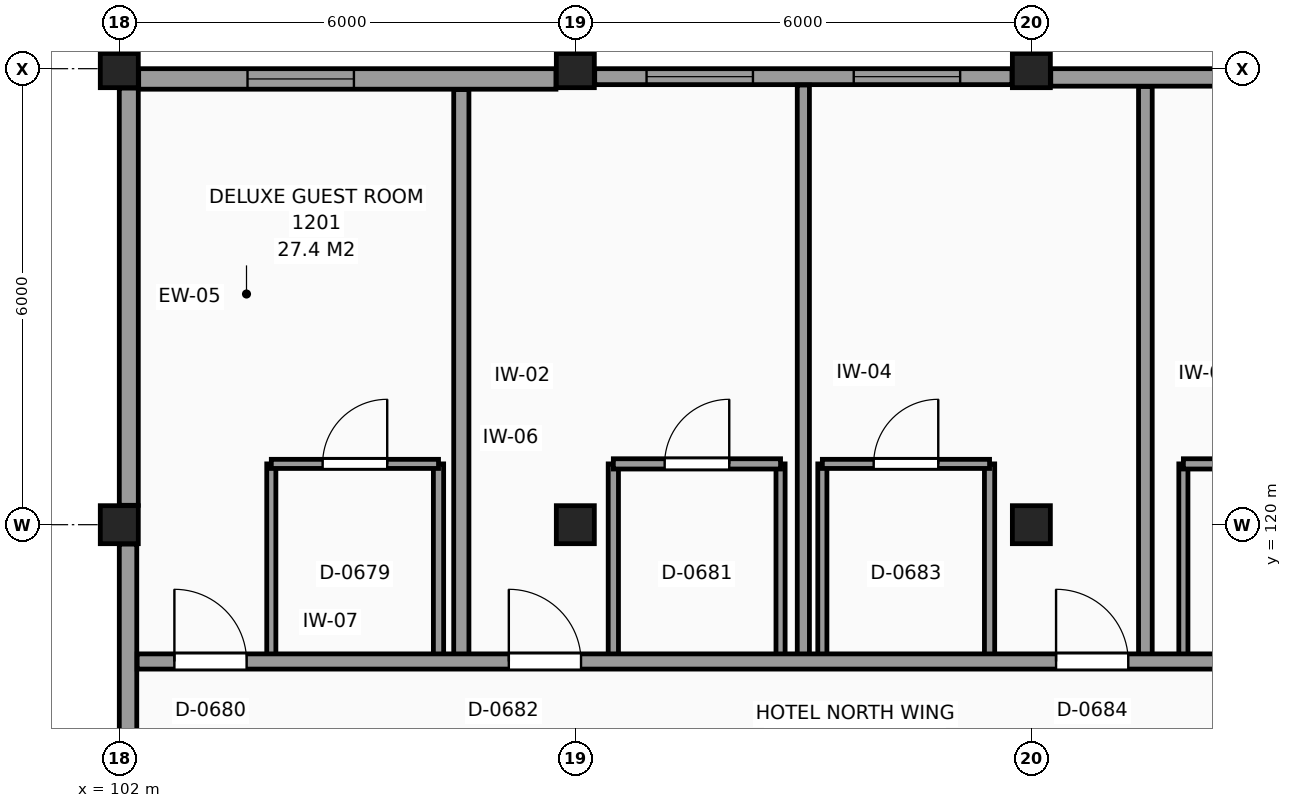
"""IFC4 building model, lengths in metres.
Left out: names, types, materials, properties, quantities, classifications, styles, units other than length and angle.
Written with IfcOpenShell. Run it as: python <this file> out.ifc"""

import sys

from ifc_helpers import new_model, si_unit, direction, frame, frame_2d, origin, origin_2d, place, context, subcontext, project, spatial, rectangle, extrude, element, fill, save


model = new_model("IFC4")
c1 = context("Model", 3, precision=1e-05, world=origin(), true_north=direction((0.0, 1.0)))
c2 = subcontext(c1, "Body", "Model", "MODEL_VIEW")
j1 = project(units=[si_unit("LENGTHUNIT", "METRE"), si_unit("PLANEANGLEUNIT", "RADIAN")], contexts=[c1])
p1 = place(None, origin())
s1 = spatial("IfcSite", under=j1, at=p1, CompositionType="ELEMENT")
p2 = place(p1, origin())
s2 = spatial("IfcBuilding", under=s1, at=p2, CompositionType="ELEMENT")
p3 = place(p2, frame((0.0, 0.0, 48.0)))
s3 = spatial("IfcBuildingStorey", under=s2, at=p3, CompositionType="ELEMENT", Elevation=48.0)
for number, where, z_axis, x_axis in (
    (1, (102.0, 120.0, 0.0), (0.0, 0.0, 1.0), (1.0, 0.0, 0.0)),
    (2, (102.0, 126.0, 0.0), (0.0, 0.0, 1.0), (1.0, 0.0, 0.0)),
    (3, (108.0, 120.0, 0.0), (0.0, 0.0, 1.0), (1.0, 0.0, 0.0)),
    (4, (108.0, 126.0, 0.0), (0.0, 0.0, 1.0), (1.0, 0.0, 0.0)),
    (5, (114.0, 120.0, 0.0), (0.0, 0.0, 1.0), (1.0, 0.0, 0.0)),
    (6, (114.0, 126.0, 0.0), (0.0, 0.0, 1.0), (1.0, 0.0, 0.0)),
):
    element("IfcColumn", number, at=place(p3, frame(where, z_axis=z_axis, x_axis=x_axis)), inside=s3, PredefinedType="COLUMN", context=c2, shape_type="SweptSolid", body=[
        extrude(rectangle(XDim=0.5, YDim=0.5, at=origin_2d()), origin(), (0.0, 0.0, 1.0), 3.3),
    ])
p4 = place(p3, frame((119.745, 125.885, 0.0), z_axis=(0.0, 0.0, 1.0), x_axis=(-1.0, 0.0, 0.0)))
e7 = element("IfcWall", 7, at=p4, inside=s3, PredefinedType="SOLIDWALL", context=c2, shape_type="SweptSolid", body=[
    extrude(rectangle(XDim=5.49, YDim=0.23, at=frame_2d((2.745, 0.0))), origin(), (0.0, 0.0, 1.0), 2.4),
])
p5 = place(p3, frame((113.745, 125.895, 0.0), z_axis=(0.0, 0.0, 1.0), x_axis=(-1.0, 0.0, 0.0)))
e8 = element("IfcWall", 8, at=p5, inside=s3, PredefinedType="SOLIDWALL", context=c2, shape_type="SweptSolid", body=[
    extrude(rectangle(XDim=5.49, YDim=0.21, at=frame_2d((2.745, 0.0))), origin(), (0.0, 0.0, 1.0), 2.4),
])
p6 = place(p5, frame((3.408, 0.0, 0.8)))
e9 = element("IfcOpeningElement", 9, at=p6, cuts=e8, PredefinedType="OPENING", context=c2, shape_type="SweptSolid", body=[
    extrude(rectangle(XDim=1.4, YDim=1.4, at=frame_2d((0.7, 0.7))), frame((0.0, 0.115, 0.0), z_axis=(0.0, -1.0, 0.0), x_axis=(1.0, 0.0, 0.0)), (0.0, 0.0, 1.0), 0.23),
])
p7 = place(p5, frame((0.682, 0.0, 0.8)))
e10 = element("IfcOpeningElement", 10, at=p7, cuts=e8, PredefinedType="OPENING", context=c2, shape_type="SweptSolid", body=[
    extrude(rectangle(XDim=1.4, YDim=1.4, at=frame_2d((0.7, 0.7))), frame((0.0, 0.115, 0.0), z_axis=(0.0, -1.0, 0.0), x_axis=(1.0, 0.0, 0.0)), (0.0, 0.0, 1.0), 0.23),
])
p8 = place(p3, frame((107.745, 125.865, 0.0), z_axis=(0.0, 0.0, 1.0), x_axis=(-1.0, 0.0, 0.0)))
e11 = element("IfcWall", 11, at=p8, inside=s3, PredefinedType="SOLIDWALL", context=c2, shape_type="SweptSolid", body=[
    extrude(rectangle(XDim=5.49, YDim=0.27, at=frame_2d((2.745, 0.0))), origin(), (0.0, 0.0, 1.0), 2.4),
])
p9 = place(p8, frame((2.658, 0.0, 0.8)))
e12 = element("IfcOpeningElement", 12, at=p9, cuts=e11, PredefinedType="OPENING", context=c2, shape_type="SweptSolid", body=[
    extrude(rectangle(XDim=1.4, YDim=1.4, at=frame_2d((0.7, 0.7))), frame((0.0, 0.145, 0.0), z_axis=(0.0, -1.0, 0.0), x_axis=(1.0, 0.0, 0.0)), (0.0, 0.0, 1.0), 0.29),
])
p10 = place(p3, frame((102.125, 125.745, 0.0), z_axis=(0.0, 0.0, 1.0), x_axis=(0.0, -1.0, 0.0)))
e13 = element("IfcWall", 13, at=p10, inside=s3, PredefinedType="SOLIDWALL", context=c2, shape_type="SweptSolid", body=[
    extrude(rectangle(XDim=5.49, YDim=0.25, at=frame_2d((2.745, 0.0))), origin(), (0.0, 0.0, 1.0), 2.25),
])
p11 = place(p3, frame((102.115, 119.745, 0.0), z_axis=(0.0, 0.0, 1.0), x_axis=(0.0, -1.0, 0.0)))
e14 = element("IfcWall", 14, at=p11, inside=s3, PredefinedType="SOLIDWALL", context=c2, shape_type="SweptSolid", body=[
    extrude(rectangle(XDim=5.49, YDim=0.23, at=frame_2d((2.745, 0.0))), origin(), (0.0, 0.0, 1.0), 2.25),
])
p12 = place(p3, frame((104.0, 118.2, 0.0), z_axis=(0.0, 0.0, 1.0), x_axis=(0.0, 1.0, 0.0)))
e15 = element("IfcWall", 15, at=p12, inside=s3, PredefinedType="PARTITIONING", context=c2, shape_type="SweptSolid", body=[
    extrude(rectangle(XDim=2.6, YDim=0.12, at=frame_2d((1.3, 0.0))), origin(), (0.0, 0.0, 1.0), 3.05),
])
p13 = place(p3, frame((106.2, 118.2, 0.0), z_axis=(0.0, 0.0, 1.0), x_axis=(0.0, 1.0, 0.0)))
e16 = element("IfcWall", 16, at=p13, inside=s3, PredefinedType="PARTITIONING", context=c2, shape_type="SweptSolid", body=[
    extrude(rectangle(XDim=2.6, YDim=0.135, at=frame_2d((1.3, 0.0))), origin(), (0.0, 0.0, 1.0), 3.05),
])
p14 = place(p3, frame((106.5, 118.2, 0.0), z_axis=(0.0, 0.0, 1.0), x_axis=(0.0, 1.0, 0.0)))
e17 = element("IfcWall", 17, at=p14, inside=s3, PredefinedType="PARTITIONING", context=c2, shape_type="SweptSolid", body=[
    extrude(rectangle(XDim=7.525, YDim=0.2, at=frame_2d((3.763, 0.0))), origin(), (0.0, 0.0, 1.0), 3.05),
])
p15 = place(p3, frame((108.5, 118.2, 0.0), z_axis=(0.0, 0.0, 1.0), x_axis=(0.0, 1.0, 0.0)))
e18 = element("IfcWall", 18, at=p15, inside=s3, PredefinedType="PARTITIONING", context=c2, shape_type="SweptSolid", body=[
    extrude(rectangle(XDim=2.6, YDim=0.135, at=frame_2d((1.3, 0.0))), origin(), (0.0, 0.0, 1.0), 3.05),
])
p16 = place(p3, frame((110.7, 118.2, 0.0), z_axis=(0.0, 0.0, 1.0), x_axis=(0.0, 1.0, 0.0)))
e19 = element("IfcWall", 19, at=p16, inside=s3, PredefinedType="PARTITIONING", context=c2, shape_type="SweptSolid", body=[
    extrude(rectangle(XDim=2.6, YDim=0.12, at=frame_2d((1.3, 0.0))), origin(), (0.0, 0.0, 1.0), 3.05),
])
p17 = place(p3, frame((111.0, 118.2, 0.0), z_axis=(0.0, 0.0, 1.0), x_axis=(0.0, 1.0, 0.0)))
e20 = element("IfcWall", 20, at=p17, inside=s3, PredefinedType="PARTITIONING", context=c2, shape_type="SweptSolid", body=[
    extrude(rectangle(XDim=7.585, YDim=0.16, at=frame_2d((3.792, 0.0))), origin(), (0.0, 0.0, 1.0), 3.05),
])
p18 = place(p3, frame((111.25, 118.2, 0.0), z_axis=(0.0, 0.0, 1.0), x_axis=(0.0, 1.0, 0.0)))
e21 = element("IfcWall", 21, at=p18, inside=s3, PredefinedType="PARTITIONING", context=c2, shape_type="SweptSolid", body=[
    extrude(rectangle(XDim=2.6, YDim=0.12, at=frame_2d((1.3, 0.0))), origin(), (0.0, 0.0, 1.0), 3.05),
])
p19 = place(p3, frame((113.45, 118.2, 0.0), z_axis=(0.0, 0.0, 1.0), x_axis=(0.0, 1.0, 0.0)))
e22 = element("IfcWall", 22, at=p19, inside=s3, PredefinedType="PARTITIONING", context=c2, shape_type="SweptSolid", body=[
    extrude(rectangle(XDim=2.6, YDim=0.135, at=frame_2d((1.3, 0.0))), origin(), (0.0, 0.0, 1.0), 3.05),
])
p20 = place(p3, frame((115.5, 118.2, 0.0), z_axis=(0.0, 0.0, 1.0), x_axis=(0.0, 1.0, 0.0)))
e23 = element("IfcWall", 23, at=p20, inside=s3, PredefinedType="PARTITIONING", context=c2, shape_type="SweptSolid", body=[
    extrude(rectangle(XDim=7.565, YDim=0.18, at=frame_2d((3.782, 0.0))), origin(), (0.0, 0.0, 1.0), 3.05),
])
p21 = place(p3, frame((116.0, 118.2, 0.0), z_axis=(0.0, 0.0, 1.0), x_axis=(0.0, 1.0, 0.0)))
e24 = element("IfcWall", 24, at=p21, inside=s3, PredefinedType="PARTITIONING", context=c2, shape_type="SweptSolid", body=[
    extrude(rectangle(XDim=2.6, YDim=0.12, at=frame_2d((1.3, 0.0))), origin(), (0.0, 0.0, 1.0), 3.05),
])
p22 = place(p3, frame((102.235, 118.2, 0.0), z_axis=(0.0, 0.0, 1.0), x_axis=(1.0, 0.0, 0.0)))
e25 = element("IfcWall", 25, at=p22, inside=s3, PredefinedType="PARTITIONING", context=c2, shape_type="SweptSolid", body=[
    extrude(rectangle(XDim=74.265, YDim=0.2, at=frame_2d((37.132, 0.0))), origin(), (0.0, 0.0, 1.0), 3.05),
])
p23 = place(p22, frame((0.49, 0.0, 0.0)))
e26 = element("IfcOpeningElement", 26, at=p23, cuts=e25, PredefinedType="OPENING", context=c2, shape_type="SweptSolid", body=[
    extrude(rectangle(XDim=0.95, YDim=2.1, at=frame_2d((0.475, 1.05))), frame((0.0, 0.11, 0.0), z_axis=(0.0, -1.0, 0.0), x_axis=(1.0, 0.0, 0.0)), (0.0, 0.0, 1.0), 0.22),
])
p24 = place(p22, frame((4.89, 0.0, 0.0)))
e27 = element("IfcOpeningElement", 27, at=p24, cuts=e25, PredefinedType="OPENING", context=c2, shape_type="SweptSolid", body=[
    extrude(rectangle(XDim=0.95, YDim=2.1, at=frame_2d((0.475, 1.05))), frame((0.0, 0.11, 0.0), z_axis=(0.0, -1.0, 0.0), x_axis=(1.0, 0.0, 0.0)), (0.0, 0.0, 1.0), 0.22),
])
p25 = place(p22, frame((12.09, 0.0, 0.0)))
e28 = element("IfcOpeningElement", 28, at=p25, cuts=e25, PredefinedType="OPENING", context=c2, shape_type="SweptSolid", body=[
    extrude(rectangle(XDim=0.95, YDim=2.1, at=frame_2d((0.475, 1.05))), frame((0.0, 0.11, 0.0), z_axis=(0.0, -1.0, 0.0), x_axis=(1.0, 0.0, 0.0)), (0.0, 0.0, 1.0), 0.22),
])
p26 = place(p22, frame((20.34, 0.0, 0.0)))
e29 = element("IfcOpeningElement", 29, at=p26, cuts=e25, PredefinedType="OPENING", context=c2, shape_type="SweptSolid", body=[
    extrude(rectangle(XDim=0.95, YDim=2.1, at=frame_2d((0.475, 1.05))), frame((0.0, 0.11, 0.0), z_axis=(0.0, -1.0, 0.0), x_axis=(1.0, 0.0, 0.0)), (0.0, 0.0, 1.0), 0.22),
])
p27 = place(p22, frame((32.34, 0.0, 0.0)))
e30 = element("IfcOpeningElement", 30, at=p27, cuts=e25, PredefinedType="OPENING", context=c2, shape_type="SweptSolid", body=[
    extrude(rectangle(XDim=0.95, YDim=2.1, at=frame_2d((0.475, 1.05))), frame((0.0, 0.11, 0.0), z_axis=(0.0, -1.0, 0.0), x_axis=(1.0, 0.0, 0.0)), (0.0, 0.0, 1.0), 0.22),
])
p28 = place(p22, frame((34.89, 0.0, 0.0)))
e31 = element("IfcOpeningElement", 31, at=p28, cuts=e25, PredefinedType="OPENING", context=c2, shape_type="SweptSolid", body=[
    extrude(rectangle(XDim=0.95, YDim=2.1, at=frame_2d((0.475, 1.05))), frame((0.0, 0.11, 0.0), z_axis=(0.0, -1.0, 0.0), x_axis=(1.0, 0.0, 0.0)), (0.0, 0.0, 1.0), 0.22),
])
p29 = place(p22, frame((42.09, 0.0, 0.0)))
e32 = element("IfcOpeningElement", 32, at=p29, cuts=e25, PredefinedType="OPENING", context=c2, shape_type="SweptSolid", body=[
    extrude(rectangle(XDim=0.95, YDim=2.1, at=frame_2d((0.475, 1.05))), frame((0.0, 0.11, 0.0), z_axis=(0.0, -1.0, 0.0), x_axis=(1.0, 0.0, 0.0)), (0.0, 0.0, 1.0), 0.22),
])
p30 = place(p22, frame((46.29, 0.0, 0.0)))
e33 = element("IfcOpeningElement", 33, at=p30, cuts=e25, PredefinedType="OPENING", context=c2, shape_type="SweptSolid", body=[
    extrude(rectangle(XDim=0.95, YDim=2.1, at=frame_2d((0.475, 1.05))), frame((0.0, 0.11, 0.0), z_axis=(0.0, -1.0, 0.0), x_axis=(1.0, 0.0, 0.0)), (0.0, 0.0, 1.0), 0.22),
])
p31 = place(p22, frame((55.59, 0.0, 0.0)))
e34 = element("IfcOpeningElement", 34, at=p31, cuts=e25, PredefinedType="OPENING", context=c2, shape_type="SweptSolid", body=[
    extrude(rectangle(XDim=0.95, YDim=2.1, at=frame_2d((0.475, 1.05))), frame((0.0, 0.11, 0.0), z_axis=(0.0, -1.0, 0.0), x_axis=(1.0, 0.0, 0.0)), (0.0, 0.0, 1.0), 0.22),
])
p32 = place(p22, frame((60.09, 0.0, 0.0)))
e35 = element("IfcOpeningElement", 35, at=p32, cuts=e25, PredefinedType="OPENING", context=c2, shape_type="SweptSolid", body=[
    extrude(rectangle(XDim=0.95, YDim=2.1, at=frame_2d((0.475, 1.05))), frame((0.0, 0.11, 0.0), z_axis=(0.0, -1.0, 0.0), x_axis=(1.0, 0.0, 0.0)), (0.0, 0.0, 1.0), 0.22),
])
p33 = place(p22, frame((64.29, 0.0, 0.0)))
e36 = element("IfcOpeningElement", 36, at=p33, cuts=e25, PredefinedType="OPENING", context=c2, shape_type="SweptSolid", body=[
    extrude(rectangle(XDim=0.95, YDim=2.1, at=frame_2d((0.475, 1.05))), frame((0.0, 0.11, 0.0), z_axis=(0.0, -1.0, 0.0), x_axis=(1.0, 0.0, 0.0)), (0.0, 0.0, 1.0), 0.22),
])
p34 = place(p22, frame((68.24, 0.0, 0.0)))
e37 = element("IfcOpeningElement", 37, at=p34, cuts=e25, PredefinedType="OPENING", context=c2, shape_type="SweptSolid", body=[
    extrude(rectangle(XDim=0.95, YDim=2.1, at=frame_2d((0.475, 1.05))), frame((0.0, 0.11, 0.0), z_axis=(0.0, -1.0, 0.0), x_axis=(1.0, 0.0, 0.0)), (0.0, 0.0, 1.0), 0.22),
])
p35 = place(p3, frame((104.0, 120.8, 0.0), z_axis=(0.0, 0.0, 1.0), x_axis=(1.0, 0.0, 0.0)))
e38 = element("IfcWall", 38, at=p35, inside=s3, PredefinedType="PARTITIONING", context=c2, shape_type="SweptSolid", body=[
    extrude(rectangle(XDim=2.2, YDim=0.12, at=frame_2d((1.1, 0.0))), origin(), (0.0, 0.0, 1.0), 3.05),
])
p36 = place(p35, frame((0.675, 0.0, 0.0)))
e39 = element("IfcOpeningElement", 39, at=p36, cuts=e38, PredefinedType="OPENING", context=c2, shape_type="SweptSolid", body=[
    extrude(rectangle(XDim=0.85, YDim=2.1, at=frame_2d((0.425, 1.05))), frame((0.0, 0.07, 0.0), z_axis=(0.0, -1.0, 0.0), x_axis=(1.0, 0.0, 0.0)), (0.0, 0.0, 1.0), 0.14),
])
p37 = place(p3, frame((108.5, 120.8, 0.0), z_axis=(0.0, 0.0, 1.0), x_axis=(1.0, 0.0, 0.0)))
e40 = element("IfcWall", 40, at=p37, inside=s3, PredefinedType="PARTITIONING", context=c2, shape_type="SweptSolid", body=[
    extrude(rectangle(XDim=2.2, YDim=0.135, at=frame_2d((1.1, 0.0))), origin(), (0.0, 0.0, 1.0), 3.05),
])
p38 = place(p37, frame((0.675, 0.0, 0.0)))
e41 = element("IfcOpeningElement", 41, at=p38, cuts=e40, PredefinedType="OPENING", context=c2, shape_type="SweptSolid", body=[
    extrude(rectangle(XDim=0.85, YDim=2.1, at=frame_2d((0.425, 1.05))), frame((0.0, 0.078, 0.0), z_axis=(0.0, -1.0, 0.0), x_axis=(1.0, 0.0, 0.0)), (0.0, 0.0, 1.0), 0.155),
])
p39 = place(p3, frame((111.25, 120.8, 0.0), z_axis=(0.0, 0.0, 1.0), x_axis=(1.0, 0.0, 0.0)))
e42 = element("IfcWall", 42, at=p39, inside=s3, PredefinedType="PARTITIONING", context=c2, shape_type="SweptSolid", body=[
    extrude(rectangle(XDim=2.2, YDim=0.12, at=frame_2d((1.1, 0.0))), origin(), (0.0, 0.0, 1.0), 3.05),
])
p40 = place(p39, frame((0.675, 0.0, 0.0)))
e43 = element("IfcOpeningElement", 43, at=p40, cuts=e42, PredefinedType="OPENING", context=c2, shape_type="SweptSolid", body=[
    extrude(rectangle(XDim=0.85, YDim=2.1, at=frame_2d((0.425, 1.05))), frame((0.0, 0.07, 0.0), z_axis=(0.0, -1.0, 0.0), x_axis=(1.0, 0.0, 0.0)), (0.0, 0.0, 1.0), 0.14),
])
p41 = place(p3, frame((116.0, 120.8, 0.0), z_axis=(0.0, 0.0, 1.0), x_axis=(1.0, 0.0, 0.0)))
e44 = element("IfcWall", 44, at=p41, inside=s3, PredefinedType="PARTITIONING", context=c2, shape_type="SweptSolid", body=[
    extrude(rectangle(XDim=2.2, YDim=0.135, at=frame_2d((1.1, 0.0))), origin(), (0.0, 0.0, 1.0), 3.05),
])
p42 = place(p41, frame((0.675, 0.0, 0.0)))
e45 = element("IfcOpeningElement", 45, at=p42, cuts=e44, PredefinedType="OPENING", context=c2, shape_type="SweptSolid", body=[
    extrude(rectangle(XDim=0.85, YDim=2.1, at=frame_2d((0.425, 1.05))), frame((0.0, 0.078, 0.0), z_axis=(0.0, -1.0, 0.0), x_axis=(1.0, 0.0, 0.0)), (0.0, 0.0, 1.0), 0.155),
])
p43 = place(p9, origin())
e46 = element("IfcWindow", 46, at=p43, inside=s3, PartitioningType="SINGLE_PANEL", PredefinedType="WINDOW", context=c2, shape_type="SweptSolid", body=[
    extrude(rectangle(XDim=1.4, YDim=1.4, at=frame_2d((0.7, 0.7))), frame((0.0, 0.03, 0.0), z_axis=(0.0, -1.0, 0.0), x_axis=(1.0, 0.0, 0.0)), (0.0, 0.0, 1.0), 0.06),
])
fill(e12, e46)
p44 = place(p6, origin())
e47 = element("IfcWindow", 47, at=p44, inside=s3, PartitioningType="SINGLE_PANEL", PredefinedType="WINDOW", context=c2, shape_type="SweptSolid", body=[
    extrude(rectangle(XDim=1.4, YDim=1.4, at=frame_2d((0.7, 0.7))), frame((0.0, 0.03, 0.0), z_axis=(0.0, -1.0, 0.0), x_axis=(1.0, 0.0, 0.0)), (0.0, 0.0, 1.0), 0.06),
])
fill(e9, e47)
p45 = place(p7, origin())
e48 = element("IfcWindow", 48, at=p45, inside=s3, PartitioningType="SINGLE_PANEL", PredefinedType="WINDOW", context=c2, shape_type="SweptSolid", body=[
    extrude(rectangle(XDim=1.4, YDim=1.4, at=frame_2d((0.7, 0.7))), frame((0.0, 0.03, 0.0), z_axis=(0.0, -1.0, 0.0), x_axis=(1.0, 0.0, 0.0)), (0.0, 0.0, 1.0), 0.06),
])
fill(e10, e48)
p46 = place(p36, origin())
e49 = element("IfcDoor", 49, at=p46, inside=s3, OperationType="SINGLE_SWING_RIGHT", PredefinedType="DOOR", context=c2, shape_type="SweptSolid", body=[
    extrude(rectangle(XDim=0.85, YDim=2.1, at=frame_2d((0.425, 1.05))), frame((0.0, 0.025, 0.0), z_axis=(0.0, -1.0, 0.0), x_axis=(1.0, 0.0, 0.0)), (0.0, 0.0, 1.0), 0.05),
])
fill(e39, e49)
p47 = place(p23, origin())
e50 = element("IfcDoor", 50, at=p47, inside=s3, OperationType="SINGLE_SWING_LEFT", PredefinedType="DOOR", context=c2, shape_type="SweptSolid", body=[
    extrude(rectangle(XDim=0.95, YDim=2.1, at=frame_2d((0.475, 1.05))), frame((0.0, 0.025, 0.0), z_axis=(0.0, -1.0, 0.0), x_axis=(1.0, 0.0, 0.0)), (0.0, 0.0, 1.0), 0.05),
])
fill(e26, e50)
p48 = place(p38, origin())
e51 = element("IfcDoor", 51, at=p48, inside=s3, OperationType="SINGLE_SWING_RIGHT", PredefinedType="DOOR", context=c2, shape_type="SweptSolid", body=[
    extrude(rectangle(XDim=0.85, YDim=2.1, at=frame_2d((0.425, 1.05))), frame((0.0, 0.025, 0.0), z_axis=(0.0, -1.0, 0.0), x_axis=(1.0, 0.0, 0.0)), (0.0, 0.0, 1.0), 0.05),
])
fill(e41, e51)
p49 = place(p24, origin())
e52 = element("IfcDoor", 52, at=p49, inside=s3, OperationType="SINGLE_SWING_LEFT", PredefinedType="DOOR", context=c2, shape_type="SweptSolid", body=[
    extrude(rectangle(XDim=0.95, YDim=2.1, at=frame_2d((0.475, 1.05))), frame((0.0, 0.025, 0.0), z_axis=(0.0, -1.0, 0.0), x_axis=(1.0, 0.0, 0.0)), (0.0, 0.0, 1.0), 0.05),
])
fill(e27, e52)
p50 = place(p40, origin())
e53 = element("IfcDoor", 53, at=p50, inside=s3, OperationType="SINGLE_SWING_RIGHT", PredefinedType="DOOR", context=c2, shape_type="SweptSolid", body=[
    extrude(rectangle(XDim=0.85, YDim=2.1, at=frame_2d((0.425, 1.05))), frame((0.0, 0.025, 0.0), z_axis=(0.0, -1.0, 0.0), x_axis=(1.0, 0.0, 0.0)), (0.0, 0.0, 1.0), 0.05),
])
fill(e43, e53)
p51 = place(p25, origin())
e54 = element("IfcDoor", 54, at=p51, inside=s3, OperationType="SINGLE_SWING_LEFT", PredefinedType="DOOR", context=c2, shape_type="SweptSolid", body=[
    extrude(rectangle(XDim=0.95, YDim=2.1, at=frame_2d((0.475, 1.05))), frame((0.0, 0.025, 0.0), z_axis=(0.0, -1.0, 0.0), x_axis=(1.0, 0.0, 0.0)), (0.0, 0.0, 1.0), 0.05),
])
fill(e28, e54)
save(model, sys.argv[1])
